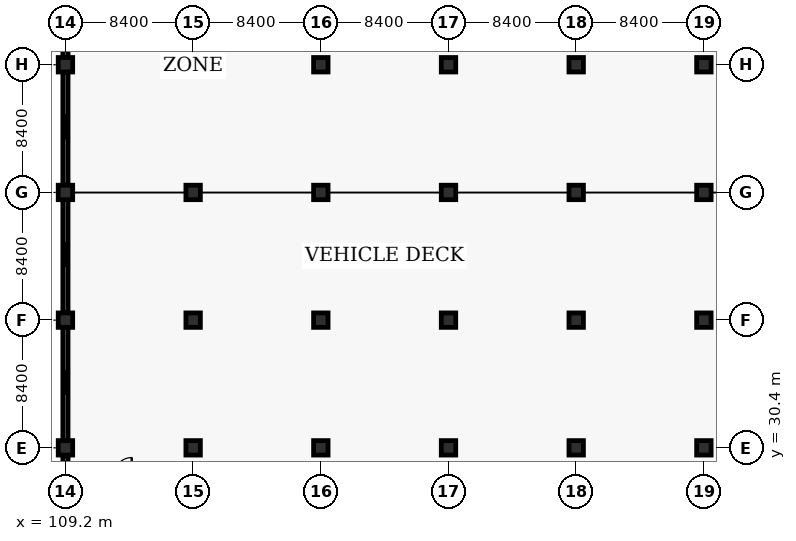
"""IFC4 building model, lengths in metres.
Left out: names, types, materials, properties, quantities, classifications, styles, units other than length and angle.
Written with IfcOpenShell. Run it as: python <this file> out.ifc"""

import sys

from ifc_helpers import new_model, si_unit, direction, frame, frame_2d, origin, origin_2d, place, context, subcontext, project, spatial, rectangle, extrude, element, fill, save


model = new_model("IFC4")
c1 = context("Model", 3, precision=1e-05, world=origin(), true_north=direction((0.0, 1.0)))
c2 = subcontext(c1, "Body", "Model", "MODEL_VIEW")
j1 = project(units=[si_unit("LENGTHUNIT", "METRE"), si_unit("PLANEANGLEUNIT", "RADIAN")], contexts=[c1])
p1 = place(None, origin())
s1 = spatial("IfcSite", under=j1, at=p1, CompositionType="ELEMENT")
p2 = place(p1, origin())
s2 = spatial("IfcBuilding", under=s1, at=p2, CompositionType="ELEMENT")
p3 = place(p2, origin())
s3 = spatial("IfcBuildingStorey", under=s2, at=p3, CompositionType="ELEMENT", Elevation=0.0)
for number, where, z_axis, x_axis in (
    (1, (109.2, 30.4, -0.46), (0.0, 0.0, 1.0), (1.0, 0.0, 0.0)),
    (2, (109.2, 38.8, -0.46), (0.0, 0.0, 1.0), (1.0, 0.0, 0.0)),
    (3, (109.2, 47.2, -0.46), (0.0, 0.0, 1.0), (1.0, 0.0, 0.0)),
    (4, (109.2, 55.6, -0.46), (0.0, 0.0, 1.0), (1.0, 0.0, 0.0)),
    (5, (117.6, 30.4, -0.46), (0.0, 0.0, 1.0), (1.0, 0.0, 0.0)),
    (6, (117.6, 38.8, -0.46), (0.0, 0.0, 1.0), (1.0, 0.0, 0.0)),
    (7, (117.6, 47.2, -0.46), (0.0, 0.0, 1.0), (1.0, 0.0, 0.0)),
    (8, (117.6, 55.6, -0.46), (0.0, 0.0, 1.0), (1.0, 0.0, 0.0)),
    (9, (126.0, 30.4, -0.46), (0.0, 0.0, 1.0), (1.0, 0.0, 0.0)),
    (10, (126.0, 38.8, -0.46), (0.0, 0.0, 1.0), (1.0, 0.0, 0.0)),
    (11, (126.0, 47.2, -0.46), (0.0, 0.0, 1.0), (1.0, 0.0, 0.0)),
    (12, (126.0, 55.6, -0.46), (0.0, 0.0, 1.0), (1.0, 0.0, 0.0)),
    (13, (134.4, 30.4, -0.46), (0.0, 0.0, 1.0), (1.0, 0.0, 0.0)),
    (14, (134.4, 38.8, -0.46), (0.0, 0.0, 1.0), (1.0, 0.0, 0.0)),
    (15, (134.4, 47.2, -0.46), (0.0, 0.0, 1.0), (1.0, 0.0, 0.0)),
    (16, (134.4, 55.6, -0.46), (0.0, 0.0, 1.0), (1.0, 0.0, 0.0)),
    (17, (142.8, 30.4, -0.46), (0.0, 0.0, 1.0), (1.0, 0.0, 0.0)),
    (18, (142.8, 38.8, -0.46), (0.0, 0.0, 1.0), (1.0, 0.0, 0.0)),
    (19, (142.8, 47.2, -0.46), (0.0, 0.0, 1.0), (1.0, 0.0, 0.0)),
    (20, (142.8, 55.6, -0.46), (0.0, 0.0, 1.0), (1.0, 0.0, 0.0)),
    (21, (151.2, 30.4, -0.46), (0.0, 0.0, 1.0), (1.0, 0.0, 0.0)),
    (22, (151.2, 38.8, -0.46), (0.0, 0.0, 1.0), (1.0, 0.0, 0.0)),
    (23, (151.2, 47.2, -0.46), (0.0, 0.0, 1.0), (1.0, 0.0, 0.0)),
    (24, (151.2, 55.6, -0.46), (0.0, 0.0, 1.0), (1.0, 0.0, 0.0)),
):
    element("IfcColumn", number, at=place(p3, frame(where, z_axis=z_axis, x_axis=x_axis)), inside=s3, PredefinedType="COLUMN", context=c2, shape_type="SweptSolid", body=[
        extrude(rectangle(XDim=0.95, YDim=0.95, at=origin_2d()), origin(), (0.0, 0.0, 1.0), 5.9),
    ])
p4 = place(p3, frame((109.2, 29.925, 0.0), z_axis=(0.0, 0.0, 1.0), x_axis=(0.0, -1.0, 0.0)))
e25 = element("IfcWall", 25, at=p4, inside=s3, PredefinedType="SOLIDWALL", context=c2, shape_type="SweptSolid", body=[
    extrude(rectangle(XDim=7.45, YDim=0.34, at=frame_2d((3.725, 0.0))), origin(), (0.0, 0.0, 1.0), 4.545),
])
p5 = place(p4, frame((2.865, 0.0, 1.35)))
e26 = element("IfcOpeningElement", 26, at=p5, cuts=e25, PredefinedType="OPENING", context=c2, shape_type="SweptSolid", body=[
    extrude(rectangle(XDim=1.5, YDim=1.1, at=frame_2d((0.75, 0.55))), frame((0.0, 0.18, 0.0), z_axis=(0.0, -1.0, 0.0), x_axis=(1.0, 0.0, 0.0)), (0.0, 0.0, 1.0), 0.36),
])
p6 = place(p3, frame((109.2, 38.325, 0.0), z_axis=(0.0, 0.0, 1.0), x_axis=(0.0, -1.0, 0.0)))
e27 = element("IfcWall", 27, at=p6, inside=s3, PredefinedType="SOLIDWALL", context=c2, shape_type="SweptSolid", body=[
    extrude(rectangle(XDim=7.45, YDim=0.34, at=frame_2d((3.725, 0.0))), origin(), (0.0, 0.0, 1.0), 4.545),
])
p7 = place(p6, frame((2.865, 0.0, 1.35)))
e28 = element("IfcOpeningElement", 28, at=p7, cuts=e27, PredefinedType="OPENING", context=c2, shape_type="SweptSolid", body=[
    extrude(rectangle(XDim=1.5, YDim=1.1, at=frame_2d((0.75, 0.55))), frame((0.0, 0.18, 0.0), z_axis=(0.0, -1.0, 0.0), x_axis=(1.0, 0.0, 0.0)), (0.0, 0.0, 1.0), 0.36),
])
p8 = place(p3, frame((109.2, 46.725, 0.0), z_axis=(0.0, 0.0, 1.0), x_axis=(0.0, -1.0, 0.0)))
e29 = element("IfcWall", 29, at=p8, inside=s3, PredefinedType="SOLIDWALL", context=c2, shape_type="SweptSolid", body=[
    extrude(rectangle(XDim=7.45, YDim=0.34, at=frame_2d((3.725, 0.0))), origin(), (0.0, 0.0, 1.0), 4.545),
])
p9 = place(p8, frame((2.865, 0.0, 1.35)))
e30 = element("IfcOpeningElement", 30, at=p9, cuts=e29, PredefinedType="OPENING", context=c2, shape_type="SweptSolid", body=[
    extrude(rectangle(XDim=1.5, YDim=1.1, at=frame_2d((0.75, 0.55))), frame((0.0, 0.18, 0.0), z_axis=(0.0, -1.0, 0.0), x_axis=(1.0, 0.0, 0.0)), (0.0, 0.0, 1.0), 0.36),
])
p10 = place(p3, frame((109.2, 55.125, 0.0), z_axis=(0.0, 0.0, 1.0), x_axis=(0.0, -1.0, 0.0)))
e31 = element("IfcWall", 31, at=p10, inside=s3, PredefinedType="SOLIDWALL", context=c2, shape_type="SweptSolid", body=[
    extrude(rectangle(XDim=7.45, YDim=0.34, at=frame_2d((3.725, 0.0))), origin(), (0.0, 0.0, 1.0), 4.545),
])
p11 = place(p10, frame((2.865, 0.0, 1.35)))
e32 = element("IfcOpeningElement", 32, at=p11, cuts=e31, PredefinedType="OPENING", context=c2, shape_type="SweptSolid", body=[
    extrude(rectangle(XDim=1.5, YDim=1.1, at=frame_2d((0.75, 0.55))), frame((0.0, 0.18, 0.0), z_axis=(0.0, -1.0, 0.0), x_axis=(1.0, 0.0, 0.0)), (0.0, 0.0, 1.0), 0.36),
])
p12 = place(p3, frame((109.2, 63.525, 0.0), z_axis=(0.0, 0.0, 1.0), x_axis=(0.0, -1.0, 0.0)))
e33 = element("IfcWall", 33, at=p12, inside=s3, PredefinedType="SOLIDWALL", context=c2, shape_type="SweptSolid", body=[
    extrude(rectangle(XDim=7.45, YDim=0.34, at=frame_2d((3.725, 0.0))), origin(), (0.0, 0.0, 1.0), 4.545),
])
p13 = place(p12, frame((2.865, 0.0, 1.35)))
e34 = element("IfcOpeningElement", 34, at=p13, cuts=e33, PredefinedType="OPENING", context=c2, shape_type="SweptSolid", body=[
    extrude(rectangle(XDim=1.5, YDim=1.1, at=frame_2d((0.75, 0.55))), frame((0.0, 0.18, 0.0), z_axis=(0.0, -1.0, 0.0), x_axis=(1.0, 0.0, 0.0)), (0.0, 0.0, 1.0), 0.36),
])
p14 = place(p7, origin())
e35 = element("IfcWindow", 35, at=p14, inside=s3, PartitioningType="SINGLE_PANEL", PredefinedType="WINDOW", context=c2, shape_type="SweptSolid", body=[
    extrude(rectangle(XDim=1.5, YDim=1.1, at=frame_2d((0.75, 0.55))), frame((0.0, 0.03, 0.0), z_axis=(0.0, -1.0, 0.0), x_axis=(1.0, 0.0, 0.0)), (0.0, 0.0, 1.0), 0.06),
])
fill(e28, e35)
p15 = place(p9, origin())
e36 = element("IfcWindow", 36, at=p15, inside=s3, PartitioningType="SINGLE_PANEL", PredefinedType="WINDOW", context=c2, shape_type="SweptSolid", body=[
    extrude(rectangle(XDim=1.5, YDim=1.1, at=frame_2d((0.75, 0.55))), frame((0.0, 0.03, 0.0), z_axis=(0.0, -1.0, 0.0), x_axis=(1.0, 0.0, 0.0)), (0.0, 0.0, 1.0), 0.06),
])
fill(e30, e36)
p16 = place(p11, origin())
e37 = element("IfcWindow", 37, at=p16, inside=s3, PartitioningType="SINGLE_PANEL", PredefinedType="WINDOW", context=c2, shape_type="SweptSolid", body=[
    extrude(rectangle(XDim=1.5, YDim=1.1, at=frame_2d((0.75, 0.55))), frame((0.0, 0.03, 0.0), z_axis=(0.0, -1.0, 0.0), x_axis=(1.0, 0.0, 0.0)), (0.0, 0.0, 1.0), 0.06),
])
fill(e32, e37)
save(model, sys.argv[1])
